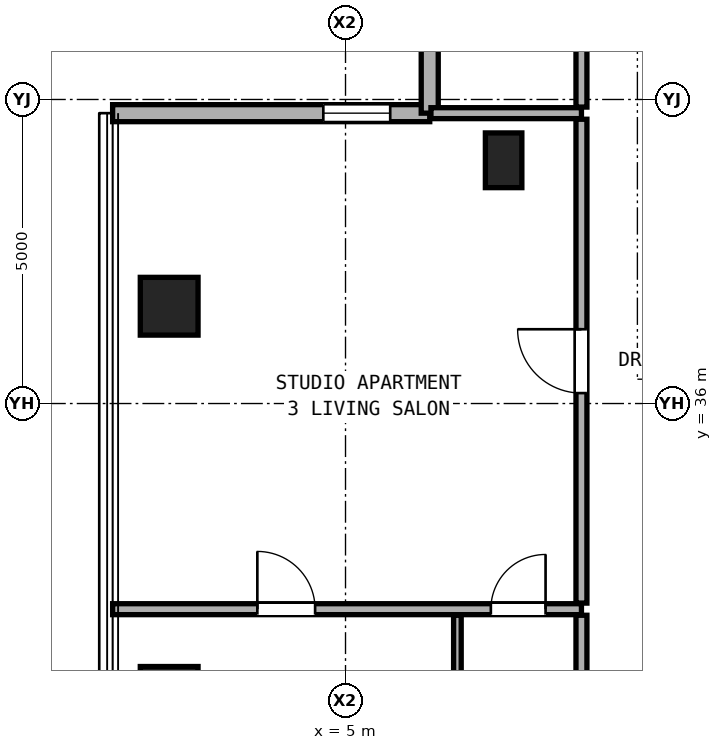
"""IFC4 building model, lengths in metres.
Left out: names, types, materials, properties, quantities, classifications, styles, units other than length and angle.
Written with IfcOpenShell. Run it as: python <this file> out.ifc"""

import sys

from ifc_helpers import new_model, si_unit, direction, frame, frame_2d, origin, origin_2d, place, context, subcontext, project, spatial, rectangle, hollow_rectangle, extrude, element, fill, save


model = new_model("IFC4")
c1 = context("Model", 3, precision=1e-05, world=origin(), true_north=direction((0.0, 1.0)))
c2 = subcontext(c1, "Body", "Model", "MODEL_VIEW")
j1 = project(units=[si_unit("LENGTHUNIT", "METRE"), si_unit("PLANEANGLEUNIT", "RADIAN")], contexts=[c1])
p1 = place(None, origin())
s1 = spatial("IfcSite", under=j1, at=p1, CompositionType="ELEMENT")
p2 = place(p1, origin())
s2 = spatial("IfcBuilding", under=s1, at=p2, CompositionType="ELEMENT")
p3 = place(p2, frame((0.0, 0.0, 183.65)))
s3 = spatial("IfcBuildingStorey", under=s2, at=p3, CompositionType="ELEMENT", Elevation=183.65)
for number, where, z_axis, x_axis in (
    (1, (2.1, 31.2, 0.0), (0.0, 0.0, 1.0), (1.0, 0.0, 0.0)),
    (2, (2.1, 37.6, 0.0), (0.0, 0.0, 1.0), (1.0, 0.0, 0.0)),
):
    element("IfcColumn", number, at=place(p3, frame(where, z_axis=z_axis, x_axis=x_axis)), inside=s3, PredefinedType="COLUMN", context=c2, shape_type="SweptSolid", body=[
        extrude(hollow_rectangle(XDim=0.95, YDim=0.95, WallThickness=0.05, at=origin_2d()), origin(), (0.0, 0.0, 1.0), 3.25),
    ])
p4 = place(p3, frame((7.6, 40.0, 0.0), z_axis=(0.0, 0.0, 1.0), x_axis=(1.0, 0.0, 0.0)))
e3 = element("IfcColumn", 3, at=p4, inside=s3, PredefinedType="PILASTER", context=c2, shape_type="SweptSolid", body=[
    extrude(rectangle(XDim=0.6, YDim=0.9, at=origin_2d()), origin(), (0.0, 0.0, 1.0), 3.25),
])
p5 = place(p3, frame((6.385, 40.775, 0.0), z_axis=(0.0, 0.0, 1.0), x_axis=(-1.0, 0.0, 0.0)))
e4 = element("IfcWall", 4, at=p5, inside=s3, PredefinedType="SOLIDWALL", context=c2, shape_type="SweptSolid", body=[
    extrude(rectangle(XDim=5.215, YDim=0.28, at=frame_2d((2.607, 0.0))), origin(), (0.0, 0.0, 1.0), 3.03),
])
p6 = place(p5, frame((0.65, 0.0, 0.85)))
e5 = element("IfcOpeningElement", 5, at=p6, cuts=e4, PredefinedType="OPENING", context=c2, shape_type="SweptSolid", body=[
    extrude(rectangle(XDim=1.1, YDim=2.0, at=frame_2d((0.55, 1.0))), frame((0.0, 0.15, 0.0), z_axis=(0.0, -1.0, 0.0), x_axis=(1.0, 0.0, 0.0)), (0.0, 0.0, 1.0), 0.3),
])
p7 = place(p3, frame((6.385, 45.99, 0.0), z_axis=(0.0, 0.0, 1.0), x_axis=(0.0, -1.0, 0.0)))
e6 = element("IfcWall", 6, at=p7, inside=s3, PredefinedType="SOLIDWALL", context=c2, shape_type="SweptSolid", body=[
    extrude(rectangle(XDim=5.215, YDim=0.28, at=frame_2d((2.607, 0.0))), origin(), (0.0, 0.0, 1.0), 3.03),
])
p8 = place(p3, frame((1.17, 32.618, 0.0), z_axis=(0.0, 0.0, 1.0), x_axis=(1.0, 0.0, 0.0)))
e7 = element("IfcWall", 7, at=p8, inside=s3, PredefinedType="PARTITIONING", context=c2, shape_type="SweptSolid", body=[
    extrude(rectangle(XDim=7.71, YDim=0.18, at=frame_2d((3.855, 0.0))), origin(), (0.0, 0.0, 1.0), 2.269),
])
p9 = place(p8, frame((2.38, 0.0, 0.0)))
e8 = element("IfcOpeningElement", 8, at=p9, cuts=e7, PredefinedType="OPENING", context=c2, shape_type="SweptSolid", body=[
    extrude(rectangle(XDim=0.95, YDim=2.15, at=frame_2d((0.475, 1.075))), frame((0.0, 0.1, 0.0), z_axis=(0.0, -1.0, 0.0), x_axis=(1.0, 0.0, 0.0)), (0.0, 0.0, 1.0), 0.2),
])
p10 = place(p8, frame((6.22, 0.0, 0.0)))
e9 = element("IfcOpeningElement", 9, at=p10, cuts=e7, PredefinedType="OPENING", context=c2, shape_type="SweptSolid", body=[
    extrude(rectangle(XDim=0.9, YDim=2.1, at=frame_2d((0.45, 1.05))), frame((0.0, 0.1, 0.0), z_axis=(0.0, -1.0, 0.0), x_axis=(1.0, 0.0, 0.0)), (0.0, 0.0, 1.0), 0.2),
])
p11 = place(p3, frame((6.405, 40.775, 0.0), z_axis=(0.0, 0.0, 1.0), x_axis=(1.0, 0.0, 0.0)))
e10 = element("IfcWall", 10, at=p11, inside=s3, PredefinedType="PARTITIONING", context=c2, shape_type="SweptSolid", body=[
    extrude(rectangle(XDim=2.475, YDim=0.18, at=frame_2d((1.237, 0.0))), origin(), (0.0, 0.0, 1.0), 3.05),
])
p12 = place(p3, frame((6.84, 29.97, 0.0), z_axis=(0.0, 0.0, 1.0), x_axis=(0.0, 1.0, 0.0)))
e11 = element("IfcWall", 11, at=p12, inside=s3, PredefinedType="PARTITIONING", context=c2, shape_type="SweptSolid", body=[
    extrude(rectangle(XDim=2.548, YDim=0.125, at=frame_2d((1.274, 0.0))), origin(), (0.0, 0.0, 1.0), 2.346),
])
p13 = place(p3, frame((8.88, 29.97, 0.0), z_axis=(0.0, 0.0, 1.0), x_axis=(0.0, 1.0, 0.0)))
e12 = element("IfcWall", 12, at=p13, inside=s3, PredefinedType="PARTITIONING", context=c2, shape_type="SweptSolid", body=[
    extrude(rectangle(XDim=2.548, YDim=0.18, at=frame_2d((1.274, 0.0))), origin(), (0.0, 0.0, 1.0), 2.346),
])
p14 = place(p3, frame((8.88, 32.718, 0.0), z_axis=(0.0, 0.0, 1.0), x_axis=(0.0, 1.0, 0.0)))
e13 = element("IfcWall", 13, at=p14, inside=s3, PredefinedType="PARTITIONING", context=c2, shape_type="SweptSolid", body=[
    extrude(rectangle(XDim=7.957, YDim=0.18, at=frame_2d((3.979, 0.0))), origin(), (0.0, 0.0, 1.0), 2.442),
])
p15 = place(p14, frame((3.454, 0.0, 0.0)))
e14 = element("IfcOpeningElement", 14, at=p15, cuts=e13, PredefinedType="OPENING", context=c2, shape_type="SweptSolid", body=[
    extrude(rectangle(XDim=1.05, YDim=2.2, at=frame_2d((0.525, 1.1))), frame((0.0, 0.1, 0.0), z_axis=(0.0, -1.0, 0.0), x_axis=(1.0, 0.0, 0.0)), (0.0, 0.0, 1.0), 0.2),
])
p16 = place(p3, frame((8.88, 40.875, 0.0), z_axis=(0.0, 0.0, 1.0), x_axis=(0.0, 1.0, 0.0)))
e15 = element("IfcWall", 15, at=p16, inside=s3, PredefinedType="PARTITIONING", context=c2, shape_type="SweptSolid", body=[
    extrude(rectangle(XDim=5.115, YDim=0.18, at=frame_2d((2.558, 0.0))), origin(), (0.0, 0.0, 1.0), 3.05),
])
p17 = place(p16, frame((2.083, 0.0, 0.0)))
e16 = element("IfcOpeningElement", 16, at=p17, cuts=e15, PredefinedType="OPENING", context=c2, shape_type="SweptSolid", body=[
    extrude(rectangle(XDim=0.95, YDim=2.15, at=frame_2d((0.475, 1.075))), frame((0.0, 0.1, 0.0), z_axis=(0.0, -1.0, 0.0), x_axis=(1.0, 0.0, 0.0)), (0.0, 0.0, 1.0), 0.2),
])
p18 = place(p6, origin())
e17 = element("IfcWindow", 17, at=p18, inside=s3, PartitioningType="SINGLE_PANEL", PredefinedType="WINDOW", context=c2, shape_type="SweptSolid", body=[
    extrude(rectangle(XDim=1.1, YDim=2.0, at=frame_2d((0.55, 1.0))), frame((0.0, 0.03, 0.0), z_axis=(0.0, -1.0, 0.0), x_axis=(1.0, 0.0, 0.0)), (0.0, 0.0, 1.0), 0.06),
])
fill(e5, e17)
p19 = place(p15, origin())
e18 = element("IfcDoor", 18, at=p19, inside=s3, OperationType="SINGLE_SWING_RIGHT", PredefinedType="DOOR", context=c2, shape_type="SweptSolid", body=[
    extrude(rectangle(XDim=1.05, YDim=2.2, at=frame_2d((0.525, 1.1))), frame((0.0, 0.025, 0.0), z_axis=(0.0, -1.0, 0.0), x_axis=(1.0, 0.0, 0.0)), (0.0, 0.0, 1.0), 0.05),
])
fill(e14, e18)
p20 = place(p9, origin())
e19 = element("IfcDoor", 19, at=p20, inside=s3, OperationType="SINGLE_SWING_LEFT", PredefinedType="DOOR", context=c2, shape_type="SweptSolid", body=[
    extrude(rectangle(XDim=0.95, YDim=2.15, at=frame_2d((0.475, 1.075))), frame((0.0, 0.025, 0.0), z_axis=(0.0, -1.0, 0.0), x_axis=(1.0, 0.0, 0.0)), (0.0, 0.0, 1.0), 0.05),
])
fill(e8, e19)
p21 = place(p10, origin())
e20 = element("IfcDoor", 20, at=p21, inside=s3, OperationType="SINGLE_SWING_RIGHT", PredefinedType="DOOR", context=c2, shape_type="SweptSolid", body=[
    extrude(rectangle(XDim=0.9, YDim=2.1, at=frame_2d((0.45, 1.05))), frame((0.0, 0.025, 0.0), z_axis=(0.0, -1.0, 0.0), x_axis=(1.0, 0.0, 0.0)), (0.0, 0.0, 1.0), 0.05),
])
fill(e9, e20)
save(model, sys.argv[1])
